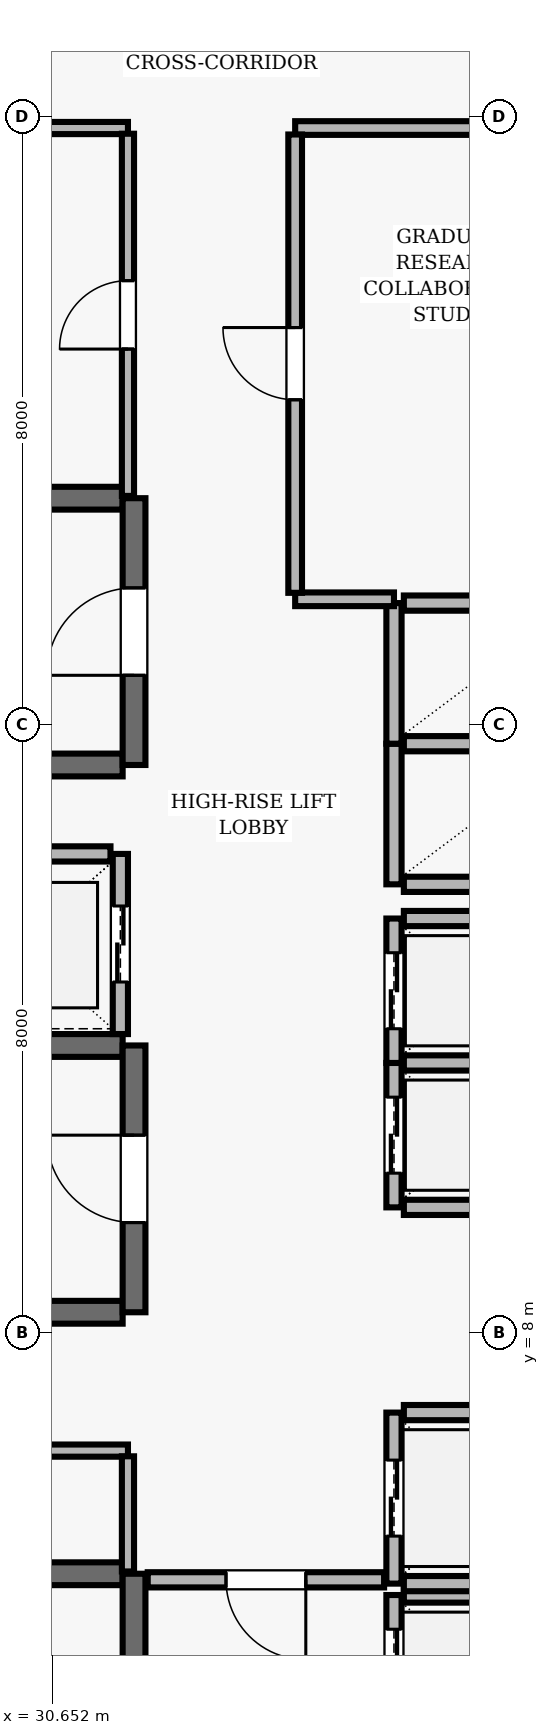
"""IFC4 building model, lengths in metres.
Left out: names, types, materials, properties, quantities, classifications, styles, units other than length and angle.
Written with IfcOpenShell. Run it as: python <this file> out.ifc"""

import sys

from ifc_helpers import new_model, si_unit, direction, frame, frame_2d, origin, place, context, subcontext, project, spatial, rectangle, extrude, element, fill, save


model = new_model("IFC4")
c1 = context("Model", 3, precision=1e-05, world=origin(), true_north=direction((0.0, 1.0)))
c2 = subcontext(c1, "Body", "Model", "MODEL_VIEW")
j1 = project(units=[si_unit("LENGTHUNIT", "METRE"), si_unit("PLANEANGLEUNIT", "RADIAN")], contexts=[c1])
p1 = place(None, origin())
s1 = spatial("IfcSite", under=j1, at=p1, CompositionType="ELEMENT")
p2 = place(p1, origin())
s2 = spatial("IfcBuilding", under=s1, at=p2, CompositionType="ELEMENT")
p3 = place(p2, frame((0.0, 0.0, 248.2)))
s3 = spatial("IfcBuildingStorey", under=s2, at=p3, CompositionType="ELEMENT", Elevation=248.2)
p4 = place(p3, frame((31.58, 4.83, 0.0), z_axis=(0.0, 0.0, 1.0), x_axis=(-1.0, 0.0, 0.0)))
e1 = element("IfcWall", 1, at=p4, inside=s3, PredefinedType="SHEAR", context=c2, shape_type="SweptSolid", body=[
    extrude(rectangle(XDim=8.36, YDim=0.3, at=frame_2d((4.18, 0.0))), origin(), (0.0, 0.0, 1.0), 3.69),
])
p5 = place(p3, frame((31.73, 0.96, 0.0), z_axis=(0.0, 0.0, 1.0), x_axis=(0.0, 1.0, 0.0)))
e2 = element("IfcWall", 2, at=p5, inside=s3, PredefinedType="SHEAR", context=c2, shape_type="SweptSolid", body=[
    extrude(rectangle(XDim=3.87, YDim=0.3, at=frame_2d((1.935, 0.0))), origin(), (0.0, 0.0, 1.0), 3.69),
])
p6 = place(p5, frame((1.54, 0.0, 0.0)))
e3 = element("IfcOpeningElement", 3, at=p6, cuts=e2, PredefinedType="OPENING", context=c2, shape_type="SweptSolid", body=[
    extrude(rectangle(XDim=1.15, YDim=2.15, at=frame_2d((0.575, 1.075))), frame((0.0, 0.16, 0.0), z_axis=(0.0, -1.0, 0.0), x_axis=(1.0, 0.0, 0.0)), (0.0, 0.0, 1.0), 0.32),
])
for number, where, z_axis, x_axis in (
    (4, (31.58, 18.98, 0.0), (0.0, 0.0, 1.0), (-1.0, 0.0, 0.0)),
    (5, (23.22, 15.47, 0.0), (0.0, 0.0, 1.0), (1.0, 0.0, 0.0)),
):
    element("IfcWall", number, at=place(p3, frame(where, z_axis=z_axis, x_axis=x_axis)), inside=s3, PredefinedType="SHEAR", context=c2, shape_type="SweptSolid", body=[
        extrude(rectangle(XDim=8.36, YDim=0.3, at=frame_2d((4.18, 0.0))), origin(), (0.0, 0.0, 1.0), 3.69),
    ])
p7 = place(p3, frame((31.73, 15.47, 0.0), z_axis=(0.0, 0.0, 1.0), x_axis=(0.0, 1.0, 0.0)))
e6 = element("IfcWall", 6, at=p7, inside=s3, PredefinedType="SHEAR", context=c2, shape_type="SweptSolid", body=[
    extrude(rectangle(XDim=3.51, YDim=0.3, at=frame_2d((1.755, 0.0))), origin(), (0.0, 0.0, 1.0), 3.69),
])
p8 = place(p7, frame((1.18, 0.0, 0.0)))
e7 = element("IfcOpeningElement", 7, at=p8, cuts=e6, PredefinedType="OPENING", context=c2, shape_type="SweptSolid", body=[
    extrude(rectangle(XDim=1.15, YDim=2.15, at=frame_2d((0.575, 1.075))), frame((0.0, 0.16, 0.0), z_axis=(0.0, -1.0, 0.0), x_axis=(1.0, 0.0, 0.0)), (0.0, 0.0, 1.0), 0.32),
])
for number, where, z_axis, x_axis in (
    (8, (31.58, 11.78, 0.0), (0.0, 0.0, 1.0), (-1.0, 0.0, 0.0)),
    (9, (23.22, 8.27, 0.0), (0.0, 0.0, 1.0), (1.0, 0.0, 0.0)),
):
    element("IfcWall", number, at=place(p3, frame(where, z_axis=z_axis, x_axis=x_axis)), inside=s3, PredefinedType="SHEAR", context=c2, shape_type="SweptSolid", body=[
        extrude(rectangle(XDim=8.36, YDim=0.3, at=frame_2d((4.18, 0.0))), origin(), (0.0, 0.0, 1.0), 3.69),
    ])
p9 = place(p3, frame((31.73, 8.27, 0.0), z_axis=(0.0, 0.0, 1.0), x_axis=(0.0, 1.0, 0.0)))
e10 = element("IfcWall", 10, at=p9, inside=s3, PredefinedType="SHEAR", context=c2, shape_type="SweptSolid", body=[
    extrude(rectangle(XDim=3.51, YDim=0.3, at=frame_2d((1.755, 0.0))), origin(), (0.0, 0.0, 1.0), 3.69),
])
p10 = place(p9, frame((1.18, 0.0, 0.0)))
e11 = element("IfcOpeningElement", 11, at=p10, cuts=e10, PredefinedType="OPENING", context=c2, shape_type="SweptSolid", body=[
    extrude(rectangle(XDim=1.15, YDim=2.15, at=frame_2d((0.575, 1.075))), frame((0.0, 0.16, 0.0), z_axis=(0.0, -1.0, 0.0), x_axis=(1.0, 0.0, 0.0)), (0.0, 0.0, 1.0), 0.32),
])
p11 = place(p3, frame((35.15, 4.55, 0.0), z_axis=(0.0, 0.0, 1.0), x_axis=(0.0, -1.0, 0.0)))
e12 = element("IfcWall", 12, at=p11, inside=s3, PredefinedType="SOLIDWALL", context=c2, shape_type="SweptSolid", body=[
    extrude(rectangle(XDim=2.1, YDim=0.2, at=frame_2d((1.05, 0.0))), origin(), (0.0, 0.0, 1.0), 3.69),
])
p12 = place(p11, frame((0.45, 0.0, 0.0)))
e13 = element("IfcOpeningElement", 13, at=p12, cuts=e12, PredefinedType="OPENING", context=c2, shape_type="SweptSolid", body=[
    extrude(rectangle(XDim=1.2, YDim=2.15, at=frame_2d((0.6, 1.075))), frame((0.0, 0.11, 0.0), z_axis=(0.0, -1.0, 0.0), x_axis=(1.0, 0.0, 0.0)), (0.0, 0.0, 1.0), 0.22),
])
p13 = place(p3, frame((37.42, 4.55, 0.0), z_axis=(0.0, 0.0, 1.0), x_axis=(-1.0, 0.0, 0.0)))
e14 = element("IfcWall", 14, at=p13, inside=s3, PredefinedType="SOLIDWALL", context=c2, shape_type="SweptSolid", body=[
    extrude(rectangle(XDim=2.14, YDim=0.2, at=frame_2d((1.07, 0.0))), origin(), (0.0, 0.0, 1.0), 3.69),
])
p14 = place(p3, frame((35.15, 6.95, 0.0), z_axis=(0.0, 0.0, 1.0), x_axis=(0.0, -1.0, 0.0)))
e15 = element("IfcWall", 15, at=p14, inside=s3, PredefinedType="SOLIDWALL", context=c2, shape_type="SweptSolid", body=[
    extrude(rectangle(XDim=2.25, YDim=0.2, at=frame_2d((1.125, 0.0))), origin(), (0.0, 0.0, 1.0), 3.69),
])
p15 = place(p14, frame((0.625, 0.0, 0.0)))
e16 = element("IfcOpeningElement", 16, at=p15, cuts=e15, PredefinedType="OPENING", context=c2, shape_type="SweptSolid", body=[
    extrude(rectangle(XDim=1.0, YDim=2.1, at=frame_2d((0.5, 1.05))), frame((0.0, 0.11, 0.0), z_axis=(0.0, -1.0, 0.0), x_axis=(1.0, 0.0, 0.0)), (0.0, 0.0, 1.0), 0.22),
])
for number, where, z_axis, x_axis in (
    (17, (35.28, 4.7, 0.0), (0.0, 0.0, 1.0), (1.0, 0.0, 0.0)),
    (18, (37.42, 6.95, 0.0), (0.0, 0.0, 1.0), (-1.0, 0.0, 0.0)),
):
    element("IfcWall", number, at=place(p3, frame(where, z_axis=z_axis, x_axis=x_axis)), inside=s3, PredefinedType="SOLIDWALL", context=c2, shape_type="SweptSolid", body=[
        extrude(rectangle(XDim=2.14, YDim=0.2, at=frame_2d((1.07, 0.0))), origin(), (0.0, 0.0, 1.0), 3.69),
    ])
p16 = place(p3, frame((35.15, 11.55, 0.0), z_axis=(0.0, 0.0, 1.0), x_axis=(0.0, -1.0, 0.0)))
e19 = element("IfcWall", 19, at=p16, inside=s3, PredefinedType="SOLIDWALL", context=c2, shape_type="SweptSolid", body=[
    extrude(rectangle(XDim=1.9, YDim=0.2, at=frame_2d((0.95, 0.0))), origin(), (0.0, 0.0, 1.0), 3.69),
])
p17 = place(p16, frame((0.45, 0.0, 0.0)))
e20 = element("IfcOpeningElement", 20, at=p17, cuts=e19, PredefinedType="OPENING", context=c2, shape_type="SweptSolid", body=[
    extrude(rectangle(XDim=1.0, YDim=2.1, at=frame_2d((0.5, 1.05))), frame((0.0, 0.11, 0.0), z_axis=(0.0, -1.0, 0.0), x_axis=(1.0, 0.0, 0.0)), (0.0, 0.0, 1.0), 0.22),
])
for number, where, z_axis, x_axis in (
    (21, (35.28, 9.65, 0.0), (0.0, 0.0, 1.0), (1.0, 0.0, 0.0)),
    (22, (37.42, 11.55, 0.0), (0.0, 0.0, 1.0), (-1.0, 0.0, 0.0)),
):
    element("IfcWall", number, at=place(p3, frame(where, z_axis=z_axis, x_axis=x_axis)), inside=s3, PredefinedType="SOLIDWALL", context=c2, shape_type="SweptSolid", body=[
        extrude(rectangle(XDim=2.14, YDim=0.2, at=frame_2d((1.07, 0.0))), origin(), (0.0, 0.0, 1.0), 3.69),
    ])
p18 = place(p3, frame((35.15, 13.45, 0.0), z_axis=(0.0, 0.0, 1.0), x_axis=(0.0, -1.0, 0.0)))
e23 = element("IfcWall", 23, at=p18, inside=s3, PredefinedType="SOLIDWALL", context=c2, shape_type="SweptSolid", body=[
    extrude(rectangle(XDim=1.9, YDim=0.2, at=frame_2d((0.95, 0.0))), origin(), (0.0, 0.0, 1.0), 3.69),
])
p19 = place(p18, frame((0.45, 0.0, 0.0)))
e24 = element("IfcOpeningElement", 24, at=p19, cuts=e23, PredefinedType="OPENING", context=c2, shape_type="SweptSolid", body=[
    extrude(rectangle(XDim=1.0, YDim=2.1, at=frame_2d((0.5, 1.05))), frame((0.0, 0.11, 0.0), z_axis=(0.0, -1.0, 0.0), x_axis=(1.0, 0.0, 0.0)), (0.0, 0.0, 1.0), 0.22),
])
p20 = place(p3, frame((37.42, 13.45, 0.0), z_axis=(0.0, 0.0, 1.0), x_axis=(-1.0, 0.0, 0.0)))
e25 = element("IfcWall", 25, at=p20, inside=s3, PredefinedType="SOLIDWALL", context=c2, shape_type="SweptSolid", body=[
    extrude(rectangle(XDim=2.14, YDim=0.2, at=frame_2d((1.07, 0.0))), origin(), (0.0, 0.0, 1.0), 3.69),
])
p21 = place(p3, frame((31.55, 11.93, 0.0), z_axis=(0.0, 0.0, 1.0), x_axis=(0.0, 1.0, 0.0)))
e26 = element("IfcWall", 26, at=p21, inside=s3, PredefinedType="SOLIDWALL", context=c2, shape_type="SweptSolid", body=[
    extrude(rectangle(XDim=2.37, YDim=0.2, at=frame_2d((1.185, 0.0))), origin(), (0.0, 0.0, 1.0), 3.69),
])
p22 = place(p21, frame((0.685, 0.0, 0.0)))
e27 = element("IfcOpeningElement", 27, at=p22, cuts=e26, PredefinedType="OPENING", context=c2, shape_type="SweptSolid", body=[
    extrude(rectangle(XDim=1.0, YDim=2.1, at=frame_2d((0.5, 1.05))), frame((0.0, 0.11, 0.0), z_axis=(0.0, -1.0, 0.0), x_axis=(1.0, 0.0, 0.0)), (0.0, 0.0, 1.0), 0.22),
])
p23 = place(p3, frame((31.42, 14.3, 0.0), z_axis=(0.0, 0.0, 1.0), x_axis=(-1.0, 0.0, 0.0)))
e28 = element("IfcWall", 28, at=p23, inside=s3, PredefinedType="SOLIDWALL", context=c2, shape_type="SweptSolid", body=[
    extrude(rectangle(XDim=2.44, YDim=0.2, at=frame_2d((1.22, 0.0))), origin(), (0.0, 0.0, 1.0), 3.69),
])
p24 = place(p3, frame((35.15, 15.75, 0.0), z_axis=(0.0, 0.0, 1.0), x_axis=(0.0, -1.0, 0.0)))
e29 = element("IfcWall", 29, at=p24, inside=s3, PredefinedType="SOLIDWALL", context=c2, shape_type="SweptSolid", body=[
    extrude(rectangle(XDim=1.85, YDim=0.2, at=frame_2d((0.925, 0.0))), origin(), (0.0, 0.0, 1.0), 3.69),
])
for number, where, z_axis, x_axis in (
    (30, (35.28, 13.9, 0.0), (0.0, 0.0, 1.0), (1.0, 0.0, 0.0)),
    (31, (37.42, 15.75, 0.0), (0.0, 0.0, 1.0), (-1.0, 0.0, 0.0)),
):
    element("IfcWall", number, at=place(p3, frame(where, z_axis=z_axis, x_axis=x_axis)), inside=s3, PredefinedType="SOLIDWALL", context=c2, shape_type="SweptSolid", body=[
        extrude(rectangle(XDim=2.14, YDim=0.2, at=frame_2d((1.07, 0.0))), origin(), (0.0, 0.0, 1.0), 3.69),
    ])
p25 = place(p3, frame((35.15, 17.6, 0.0), z_axis=(0.0, 0.0, 1.0), x_axis=(0.0, -1.0, 0.0)))
e32 = element("IfcWall", 32, at=p25, inside=s3, PredefinedType="SOLIDWALL", context=c2, shape_type="SweptSolid", body=[
    extrude(rectangle(XDim=1.85, YDim=0.2, at=frame_2d((0.925, 0.0))), origin(), (0.0, 0.0, 1.0), 3.69),
])
p26 = place(p3, frame((37.42, 17.6, 0.0), z_axis=(0.0, 0.0, 1.0), x_axis=(-1.0, 0.0, 0.0)))
e33 = element("IfcWall", 33, at=p26, inside=s3, PredefinedType="SOLIDWALL", context=c2, shape_type="SweptSolid", body=[
    extrude(rectangle(XDim=2.14, YDim=0.2, at=frame_2d((1.07, 0.0))), origin(), (0.0, 0.0, 1.0), 3.69),
])
p27 = place(p3, frame((28.55, 6.45, 0.0), z_axis=(0.0, 0.0, 1.0), x_axis=(1.0, 0.0, 0.0)))
e34 = element("IfcWall", 34, at=p27, inside=s3, PredefinedType="PARTITIONING", context=c2, shape_type="SweptSolid", body=[
    extrude(rectangle(XDim=3.1, YDim=0.16, at=frame_2d((1.55, 0.0))), origin(), (0.0, 0.0, 1.0), 3.69),
])
p28 = place(p27, frame((1.11, 0.0, 0.0)))
e35 = element("IfcOpeningElement", 35, at=p28, cuts=e34, PredefinedType="OPENING", context=c2, shape_type="SweptSolid", body=[
    extrude(rectangle(XDim=0.88, YDim=2.1, at=frame_2d((0.44, 1.05))), frame((0.0, 0.09, 0.0), z_axis=(0.0, -1.0, 0.0), x_axis=(1.0, 0.0, 0.0)), (0.0, 0.0, 1.0), 0.18),
])
p29 = place(p3, frame((31.65, 23.85, 0.0), z_axis=(0.0, 0.0, 1.0), x_axis=(-1.0, 0.0, 0.0)))
e36 = element("IfcWall", 36, at=p29, inside=s3, PredefinedType="PARTITIONING", context=c2, shape_type="SweptSolid", body=[
    extrude(rectangle(XDim=2.85, YDim=0.16, at=frame_2d((1.425, 0.0))), origin(), (0.0, 0.0, 1.0), 3.221),
])
p30 = place(p3, frame((33.85, 17.65, 0.0), z_axis=(0.0, 0.0, 1.0), x_axis=(1.0, 0.0, 0.0)))
e37 = element("IfcWall", 37, at=p30, inside=s3, PredefinedType="PARTITIONING", context=c2, shape_type="SweptSolid", body=[
    extrude(rectangle(XDim=1.3, YDim=0.18, at=frame_2d((0.65, 0.0))), origin(), (0.0, 0.0, 1.0), 3.69),
])
p31 = place(p3, frame((35.02, 4.75, 0.0), z_axis=(0.0, 0.0, 1.0), x_axis=(-1.0, 0.0, 0.0)))
e38 = element("IfcWall", 38, at=p31, inside=s3, PredefinedType="SOLIDWALL", context=c2, shape_type="SweptSolid", body=[
    extrude(rectangle(XDim=3.11, YDim=0.2, at=frame_2d((1.555, 0.0))), origin(), (0.0, 0.0, 1.0), 3.69),
])
p32 = place(p31, frame((1.03, 0.0, 0.0)))
e39 = element("IfcOpeningElement", 39, at=p32, cuts=e38, PredefinedType="OPENING", context=c2, shape_type="SweptSolid", body=[
    extrude(rectangle(XDim=1.05, YDim=2.15, at=frame_2d((0.525, 1.075))), frame((0.0, 0.11, 0.0), z_axis=(0.0, -1.0, 0.0), x_axis=(1.0, 0.0, 0.0)), (0.0, 0.0, 1.0), 0.22),
])
p33 = place(p3, frame((37.85, 23.85, 0.0), z_axis=(0.0, 0.0, 1.0), x_axis=(-1.0, 0.0, 0.0)))
e40 = element("IfcWall", 40, at=p33, inside=s3, PredefinedType="PARTITIONING", context=c2, shape_type="SweptSolid", body=[
    extrude(rectangle(XDim=4.0, YDim=0.18, at=frame_2d((2.0, 0.0))), origin(), (0.0, 0.0, 1.0), 3.221),
])
p34 = place(p3, frame((31.65, 4.86, 0.0), z_axis=(0.0, 0.0, 1.0), x_axis=(0.0, 1.0, 0.0)))
e41 = element("IfcWall", 41, at=p34, inside=s3, PredefinedType="PARTITIONING", context=c2, shape_type="SweptSolid", body=[
    extrude(rectangle(XDim=1.515, YDim=0.16, at=frame_2d((0.757, 0.0))), origin(), (0.0, 0.0, 1.0), 3.69),
])
p35 = place(p3, frame((31.65, 19.01, 0.0), z_axis=(0.0, 0.0, 1.0), x_axis=(0.0, 1.0, 0.0)))
e42 = element("IfcWall", 42, at=p35, inside=s3, PredefinedType="PARTITIONING", context=c2, shape_type="SweptSolid", body=[
    extrude(rectangle(XDim=4.765, YDim=0.16, at=frame_2d((2.382, 0.0))), origin(), (0.0, 0.0, 1.0), 3.69),
])
p36 = place(p35, frame((1.932, 0.0, 0.0)))
e43 = element("IfcOpeningElement", 43, at=p36, cuts=e42, PredefinedType="OPENING", context=c2, shape_type="SweptSolid", body=[
    extrude(rectangle(XDim=0.9, YDim=2.1, at=frame_2d((0.45, 1.05))), frame((0.0, 0.09, 0.0), z_axis=(0.0, -1.0, 0.0), x_axis=(1.0, 0.0, 0.0)), (0.0, 0.0, 1.0), 0.18),
])
p37 = place(p3, frame((33.85, 17.735, 0.0), z_axis=(0.0, 0.0, 1.0), x_axis=(0.0, 1.0, 0.0)))
e44 = element("IfcWall", 44, at=p37, inside=s3, PredefinedType="PARTITIONING", context=c2, shape_type="SweptSolid", body=[
    extrude(rectangle(XDim=6.03, YDim=0.18, at=frame_2d((3.015, 0.0))), origin(), (0.0, 0.0, 1.0), 3.69),
])
p38 = place(p37, frame((2.54, 0.0, 0.0)))
e45 = element("IfcOpeningElement", 45, at=p38, cuts=e44, PredefinedType="OPENING", context=c2, shape_type="SweptSolid", body=[
    extrude(rectangle(XDim=0.95, YDim=2.1, at=frame_2d((0.475, 1.05))), frame((0.0, 0.1, 0.0), z_axis=(0.0, -1.0, 0.0), x_axis=(1.0, 0.0, 0.0)), (0.0, 0.0, 1.0), 0.2),
])
p39 = place(p8, origin())
e46 = element("IfcDoor", 46, at=p39, inside=s3, OperationType="SINGLE_SWING_LEFT", PredefinedType="DOOR", context=c2, shape_type="SweptSolid", body=[
    extrude(rectangle(XDim=1.15, YDim=2.15, at=frame_2d((0.575, 1.075))), frame((0.0, 0.025, 0.0), z_axis=(0.0, -1.0, 0.0), x_axis=(1.0, 0.0, 0.0)), (0.0, 0.0, 1.0), 0.05),
])
fill(e7, e46)
p40 = place(p10, origin())
e47 = element("IfcDoor", 47, at=p40, inside=s3, OperationType="SINGLE_SWING_RIGHT", PredefinedType="DOOR", context=c2, shape_type="SweptSolid", body=[
    extrude(rectangle(XDim=1.15, YDim=2.15, at=frame_2d((0.575, 1.075))), frame((0.0, 0.025, 0.0), z_axis=(0.0, -1.0, 0.0), x_axis=(1.0, 0.0, 0.0)), (0.0, 0.0, 1.0), 0.05),
])
fill(e11, e47)
p41 = place(p12, origin())
e48 = element("IfcDoor", 48, at=p41, inside=s3, OperationType="DOUBLE_DOOR_SLIDING", PredefinedType="DOOR", context=c2, shape_type="SweptSolid", body=[
    extrude(rectangle(XDim=1.2, YDim=2.15, at=frame_2d((0.6, 1.075))), frame((0.0, 0.025, 0.0), z_axis=(0.0, -1.0, 0.0), x_axis=(1.0, 0.0, 0.0)), (0.0, 0.0, 1.0), 0.05),
])
fill(e13, e48)
p42 = place(p15, origin())
e49 = element("IfcDoor", 49, at=p42, inside=s3, OperationType="DOUBLE_DOOR_SLIDING", PredefinedType="DOOR", context=c2, shape_type="SweptSolid", body=[
    extrude(rectangle(XDim=1.0, YDim=2.1, at=frame_2d((0.5, 1.05))), frame((0.0, 0.025, 0.0), z_axis=(0.0, -1.0, 0.0), x_axis=(1.0, 0.0, 0.0)), (0.0, 0.0, 1.0), 0.05),
])
fill(e16, e49)
p43 = place(p17, origin())
e50 = element("IfcDoor", 50, at=p43, inside=s3, OperationType="DOUBLE_DOOR_SLIDING", PredefinedType="DOOR", context=c2, shape_type="SweptSolid", body=[
    extrude(rectangle(XDim=1.0, YDim=2.1, at=frame_2d((0.5, 1.05))), frame((0.0, 0.025, 0.0), z_axis=(0.0, -1.0, 0.0), x_axis=(1.0, 0.0, 0.0)), (0.0, 0.0, 1.0), 0.05),
])
fill(e20, e50)
p44 = place(p19, origin())
e51 = element("IfcDoor", 51, at=p44, inside=s3, OperationType="DOUBLE_DOOR_SLIDING", PredefinedType="DOOR", context=c2, shape_type="SweptSolid", body=[
    extrude(rectangle(XDim=1.0, YDim=2.1, at=frame_2d((0.5, 1.05))), frame((0.0, 0.025, 0.0), z_axis=(0.0, -1.0, 0.0), x_axis=(1.0, 0.0, 0.0)), (0.0, 0.0, 1.0), 0.05),
])
fill(e24, e51)
p45 = place(p22, origin())
e52 = element("IfcDoor", 52, at=p45, inside=s3, OperationType="DOUBLE_DOOR_SLIDING", PredefinedType="DOOR", context=c2, shape_type="SweptSolid", body=[
    extrude(rectangle(XDim=1.0, YDim=2.1, at=frame_2d((0.5, 1.05))), frame((0.0, 0.025, 0.0), z_axis=(0.0, -1.0, 0.0), x_axis=(1.0, 0.0, 0.0)), (0.0, 0.0, 1.0), 0.05),
])
fill(e27, e52)
p46 = place(p32, origin())
e53 = element("IfcDoor", 53, at=p46, inside=s3, OperationType="SINGLE_SWING_LEFT", PredefinedType="DOOR", context=c2, shape_type="SweptSolid", body=[
    extrude(rectangle(XDim=1.05, YDim=2.15, at=frame_2d((0.525, 1.075))), frame((0.0, 0.025, 0.0), z_axis=(0.0, -1.0, 0.0), x_axis=(1.0, 0.0, 0.0)), (0.0, 0.0, 1.0), 0.05),
])
fill(e39, e53)
p47 = place(p38, origin())
e54 = element("IfcDoor", 54, at=p47, inside=s3, OperationType="SINGLE_SWING_RIGHT", PredefinedType="DOOR", context=c2, shape_type="SweptSolid", body=[
    extrude(rectangle(XDim=0.95, YDim=2.1, at=frame_2d((0.475, 1.05))), frame((0.0, 0.025, 0.0), z_axis=(0.0, -1.0, 0.0), x_axis=(1.0, 0.0, 0.0)), (0.0, 0.0, 1.0), 0.05),
])
fill(e45, e54)
p48 = place(p36, origin())
e55 = element("IfcDoor", 55, at=p48, inside=s3, OperationType="SINGLE_SWING_LEFT", PredefinedType="DOOR", context=c2, shape_type="SweptSolid", body=[
    extrude(rectangle(XDim=0.9, YDim=2.1, at=frame_2d((0.45, 1.05))), frame((0.0, 0.025, 0.0), z_axis=(0.0, -1.0, 0.0), x_axis=(1.0, 0.0, 0.0)), (0.0, 0.0, 1.0), 0.05),
])
fill(e43, e55)
save(model, sys.argv[1])
